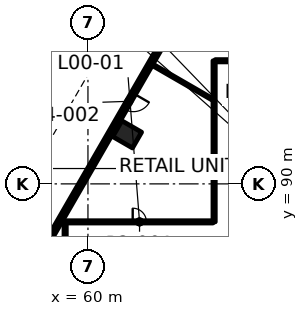
"""IFC4 building model, lengths in metres.
Left out: names, types, materials, properties, quantities, classifications, styles, units other than length and angle.
Written with IfcOpenShell. Run it as: python <this file> out.ifc"""

import sys

from ifc_helpers import new_model, si_unit, direction, frame, frame_2d, origin, origin_2d, place, context, subcontext, project, spatial, rectangle, extrude, element, fill, save


model = new_model("IFC4")
c1 = context("Model", 3, precision=1e-05, world=origin(), true_north=direction((0.0, 1.0)))
c2 = subcontext(c1, "Body", "Model", "MODEL_VIEW")
j1 = project(units=[si_unit("LENGTHUNIT", "METRE"), si_unit("PLANEANGLEUNIT", "RADIAN")], contexts=[c1])
p1 = place(None, origin())
s1 = spatial("IfcSite", under=j1, at=p1, CompositionType="ELEMENT")
p2 = place(p1, origin())
s2 = spatial("IfcBuilding", under=s1, at=p2, CompositionType="ELEMENT")
p3 = place(p2, origin())
s3 = spatial("IfcBuildingStorey", under=s2, at=p3, CompositionType="ELEMENT", Elevation=0.0)
p4 = place(p3, frame((62.579, 93.256, 0.0), z_axis=(0.0, 0.0, 1.0), x_axis=(-0.5, -0.866025403784, 0.0)))
e1 = element("IfcColumn", 1, at=p4, inside=s3, PredefinedType="COLUMN", context=c2, shape_type="SweptSolid", body=[
    extrude(rectangle(XDim=1.2, YDim=1.5, at=origin_2d()), origin(), (0.0, 0.0, 1.0), 8.0),
])
p5 = place(p3, frame((58.563, 87.5, 0.0), z_axis=(0.0, 0.0, 1.0), x_axis=(1.0, 0.0, 0.0)))
e2 = element("IfcWall", 2, at=p5, inside=s3, PredefinedType="PARTITIONING", context=c2, shape_type="SweptSolid", body=[
    extrude(rectangle(XDim=9.662, YDim=0.15, at=frame_2d((4.831, 0.0))), origin(), (0.0, 0.0, 1.0), 6.865),
])
p6 = place(p5, frame((4.381, 0.0, 0.0)))
e3 = element("IfcOpeningElement", 3, at=p6, cuts=e2, PredefinedType="OPENING", context=c2, shape_type="SweptSolid", body=[
    extrude(rectangle(XDim=0.9, YDim=2.1, at=frame_2d((0.45, 1.05))), frame((0.0, 0.085, 0.0), z_axis=(0.0, -1.0, 0.0), x_axis=(1.0, 0.0, 0.0)), (0.0, 0.0, 1.0), 0.17),
])
p7 = place(p3, frame((68.375, 98.1, 0.0), z_axis=(0.0, 0.0, 1.0), x_axis=(1.0, 0.0, 0.0)))
e4 = element("IfcWall", 4, at=p7, inside=s3, PredefinedType="PARTITIONING", context=c2, shape_type="SweptSolid", body=[
    extrude(rectangle(XDim=5.649, YDim=0.15, at=frame_2d((2.825, 0.0))), origin(), (0.0, 0.0, 1.0), 7.1),
])
p8 = place(p7, frame((2.375, 0.0, 0.0)))
e5 = element("IfcOpeningElement", 5, at=p8, cuts=e4, PredefinedType="OPENING", context=c2, shape_type="SweptSolid", body=[
    extrude(rectangle(XDim=0.9, YDim=2.1, at=frame_2d((0.45, 1.05))), frame((0.0, 0.085, 0.0), z_axis=(0.0, -1.0, 0.0), x_axis=(1.0, 0.0, 0.0)), (0.0, 0.0, 1.0), 0.17),
])
p9 = place(p3, frame((68.3, 87.5, 0.0), z_axis=(0.0, 0.0, 1.0), x_axis=(0.0, 1.0, 0.0)))
e6 = element("IfcWall", 6, at=p9, inside=s3, PredefinedType="PARTITIONING", context=c2, shape_type="SweptSolid", body=[
    extrude(rectangle(XDim=10.6, YDim=0.15, at=frame_2d((5.3, 0.0))), origin(), (0.0, 0.0, 1.0), 7.1),
])
p10 = place(p3, frame((58.5, 85.219, 0.0), z_axis=(0.0, 0.0, 1.0), x_axis=(0.0, 1.0, 0.0)))
e7 = element("IfcWall", 7, at=p10, inside=s3, PredefinedType="PARTITIONING", context=c2, shape_type="SweptSolid", body=[
    extrude(rectangle(XDim=2.17, YDim=0.15, at=frame_2d((1.085, 0.0))), origin(), (0.0, 0.0, 1.0), 6.865),
])
p11 = place(p3, frame((68.199, 95.554, 0.0), z_axis=(0.0, 0.0, 1.0), x_axis=(-0.866033412818, 0.49998612769, 0.0)))
e8 = element("IfcWall", 8, at=p11, inside=s3, PredefinedType="PARTITIONING", context=c2, shape_type="SweptSolid", body=[
    extrude(rectangle(XDim=4.676, YDim=0.1, at=frame_2d((2.338, 0.0))), origin(), (0.0, 0.0, 1.0), 6.865),
])
p12 = place(p3, frame((71.348, 110.424, 0.0), z_axis=(0.0, 0.0, 1.0), x_axis=(-0.500000550228, -0.86602508611, 0.0)))
e9 = element("IfcWall", 9, at=p12, inside=s3, PredefinedType="SOLIDWALL", context=c2, shape_type="SweptSolid", body=[
    extrude(rectangle(XDim=57.704, YDim=0.3, at=frame_2d((28.852, 0.0))), origin(), (0.0, 0.0, 1.0), 7.7),
])
p13 = place(p12, frame((16.711, 0.0, 0.0)))
e10 = element("IfcOpeningElement", 10, at=p13, cuts=e9, PredefinedType="OPENING", context=c2, shape_type="SweptSolid", body=[
    extrude(rectangle(XDim=1.2, YDim=2.4, at=frame_2d((0.6, 1.2))), frame((0.0, 0.16, 0.0), z_axis=(0.0, -1.0, 0.0), x_axis=(1.0, 0.0, 0.0)), (0.0, 0.0, 1.0), 0.32),
])
p14 = place(p12, frame((1.552, 0.0, 0.15)))
e11 = element("IfcOpeningElement", 11, at=p14, cuts=e9, PredefinedType="OPENING", context=c2, shape_type="SweptSolid", body=[
    extrude(rectangle(XDim=2.1, YDim=5.4, at=frame_2d((1.05, 2.7))), frame((0.0, 0.16, 0.0), z_axis=(0.0, -1.0, 0.0), x_axis=(1.0, 0.0, 0.0)), (0.0, 0.0, 1.0), 0.32),
])
p15 = place(p12, frame((4.052, 0.0, 0.15)))
e12 = element("IfcOpeningElement", 12, at=p15, cuts=e9, PredefinedType="OPENING", context=c2, shape_type="SweptSolid", body=[
    extrude(rectangle(XDim=2.1, YDim=5.4, at=frame_2d((1.05, 2.7))), frame((0.0, 0.16, 0.0), z_axis=(0.0, -1.0, 0.0), x_axis=(1.0, 0.0, 0.0)), (0.0, 0.0, 1.0), 0.32),
])
p16 = place(p12, frame((6.552, 0.0, 0.15)))
e13 = element("IfcOpeningElement", 13, at=p16, cuts=e9, PredefinedType="OPENING", context=c2, shape_type="SweptSolid", body=[
    extrude(rectangle(XDim=2.1, YDim=5.4, at=frame_2d((1.05, 2.7))), frame((0.0, 0.16, 0.0), z_axis=(0.0, -1.0, 0.0), x_axis=(1.0, 0.0, 0.0)), (0.0, 0.0, 1.0), 0.32),
])
p17 = place(p12, frame((9.052, 0.0, 0.15)))
e14 = element("IfcOpeningElement", 14, at=p17, cuts=e9, PredefinedType="OPENING", context=c2, shape_type="SweptSolid", body=[
    extrude(rectangle(XDim=2.1, YDim=5.4, at=frame_2d((1.05, 2.7))), frame((0.0, 0.16, 0.0), z_axis=(0.0, -1.0, 0.0), x_axis=(1.0, 0.0, 0.0)), (0.0, 0.0, 1.0), 0.32),
])
p18 = place(p12, frame((11.552, 0.0, 0.15)))
e15 = element("IfcOpeningElement", 15, at=p18, cuts=e9, PredefinedType="OPENING", context=c2, shape_type="SweptSolid", body=[
    extrude(rectangle(XDim=2.1, YDim=5.4, at=frame_2d((1.05, 2.7))), frame((0.0, 0.16, 0.0), z_axis=(0.0, -1.0, 0.0), x_axis=(1.0, 0.0, 0.0)), (0.0, 0.0, 1.0), 0.32),
])
p19 = place(p12, frame((14.052, 0.0, 0.15)))
e16 = element("IfcOpeningElement", 16, at=p19, cuts=e9, PredefinedType="OPENING", context=c2, shape_type="SweptSolid", body=[
    extrude(rectangle(XDim=2.1, YDim=5.4, at=frame_2d((1.05, 2.7))), frame((0.0, 0.16, 0.0), z_axis=(0.0, -1.0, 0.0), x_axis=(1.0, 0.0, 0.0)), (0.0, 0.0, 1.0), 0.32),
])
p20 = place(p12, frame((19.052, 0.0, 0.15)))
e17 = element("IfcOpeningElement", 17, at=p20, cuts=e9, PredefinedType="OPENING", context=c2, shape_type="SweptSolid", body=[
    extrude(rectangle(XDim=2.1, YDim=5.4, at=frame_2d((1.05, 2.7))), frame((0.0, 0.16, 0.0), z_axis=(0.0, -1.0, 0.0), x_axis=(1.0, 0.0, 0.0)), (0.0, 0.0, 1.0), 0.32),
])
p21 = place(p12, frame((21.552, 0.0, 0.15)))
e18 = element("IfcOpeningElement", 18, at=p21, cuts=e9, PredefinedType="OPENING", context=c2, shape_type="SweptSolid", body=[
    extrude(rectangle(XDim=2.1, YDim=5.4, at=frame_2d((1.05, 2.7))), frame((0.0, 0.16, 0.0), z_axis=(0.0, -1.0, 0.0), x_axis=(1.0, 0.0, 0.0)), (0.0, 0.0, 1.0), 0.32),
])
p22 = place(p12, frame((24.052, 0.0, 0.15)))
e19 = element("IfcOpeningElement", 19, at=p22, cuts=e9, PredefinedType="OPENING", context=c2, shape_type="SweptSolid", body=[
    extrude(rectangle(XDim=2.1, YDim=5.4, at=frame_2d((1.05, 2.7))), frame((0.0, 0.16, 0.0), z_axis=(0.0, -1.0, 0.0), x_axis=(1.0, 0.0, 0.0)), (0.0, 0.0, 1.0), 0.32),
])
p23 = place(p12, frame((26.552, 0.0, 0.15)))
e20 = element("IfcOpeningElement", 20, at=p23, cuts=e9, PredefinedType="OPENING", context=c2, shape_type="SweptSolid", body=[
    extrude(rectangle(XDim=2.1, YDim=5.4, at=frame_2d((1.05, 2.7))), frame((0.0, 0.16, 0.0), z_axis=(0.0, -1.0, 0.0), x_axis=(1.0, 0.0, 0.0)), (0.0, 0.0, 1.0), 0.32),
])
p24 = place(p12, frame((29.052, 0.0, 0.15)))
e21 = element("IfcOpeningElement", 21, at=p24, cuts=e9, PredefinedType="OPENING", context=c2, shape_type="SweptSolid", body=[
    extrude(rectangle(XDim=2.1, YDim=5.4, at=frame_2d((1.05, 2.7))), frame((0.0, 0.16, 0.0), z_axis=(0.0, -1.0, 0.0), x_axis=(1.0, 0.0, 0.0)), (0.0, 0.0, 1.0), 0.32),
])
p25 = place(p12, frame((31.552, 0.0, 0.15)))
e22 = element("IfcOpeningElement", 22, at=p25, cuts=e9, PredefinedType="OPENING", context=c2, shape_type="SweptSolid", body=[
    extrude(rectangle(XDim=2.1, YDim=5.4, at=frame_2d((1.05, 2.7))), frame((0.0, 0.16, 0.0), z_axis=(0.0, -1.0, 0.0), x_axis=(1.0, 0.0, 0.0)), (0.0, 0.0, 1.0), 0.32),
])
p26 = place(p12, frame((34.052, 0.0, 0.15)))
e23 = element("IfcOpeningElement", 23, at=p26, cuts=e9, PredefinedType="OPENING", context=c2, shape_type="SweptSolid", body=[
    extrude(rectangle(XDim=2.1, YDim=5.4, at=frame_2d((1.05, 2.7))), frame((0.0, 0.16, 0.0), z_axis=(0.0, -1.0, 0.0), x_axis=(1.0, 0.0, 0.0)), (0.0, 0.0, 1.0), 0.32),
])
p27 = place(p12, frame((36.552, 0.0, 0.15)))
e24 = element("IfcOpeningElement", 24, at=p27, cuts=e9, PredefinedType="OPENING", context=c2, shape_type="SweptSolid", body=[
    extrude(rectangle(XDim=2.1, YDim=5.4, at=frame_2d((1.05, 2.7))), frame((0.0, 0.16, 0.0), z_axis=(0.0, -1.0, 0.0), x_axis=(1.0, 0.0, 0.0)), (0.0, 0.0, 1.0), 0.32),
])
p28 = place(p12, frame((39.052, 0.0, 0.15)))
e25 = element("IfcOpeningElement", 25, at=p28, cuts=e9, PredefinedType="OPENING", context=c2, shape_type="SweptSolid", body=[
    extrude(rectangle(XDim=2.1, YDim=5.4, at=frame_2d((1.05, 2.7))), frame((0.0, 0.16, 0.0), z_axis=(0.0, -1.0, 0.0), x_axis=(1.0, 0.0, 0.0)), (0.0, 0.0, 1.0), 0.32),
])
p29 = place(p12, frame((41.552, 0.0, 0.15)))
e26 = element("IfcOpeningElement", 26, at=p29, cuts=e9, PredefinedType="OPENING", context=c2, shape_type="SweptSolid", body=[
    extrude(rectangle(XDim=2.1, YDim=5.4, at=frame_2d((1.05, 2.7))), frame((0.0, 0.16, 0.0), z_axis=(0.0, -1.0, 0.0), x_axis=(1.0, 0.0, 0.0)), (0.0, 0.0, 1.0), 0.32),
])
p30 = place(p12, frame((44.052, 0.0, 0.15)))
e27 = element("IfcOpeningElement", 27, at=p30, cuts=e9, PredefinedType="OPENING", context=c2, shape_type="SweptSolid", body=[
    extrude(rectangle(XDim=2.1, YDim=5.4, at=frame_2d((1.05, 2.7))), frame((0.0, 0.16, 0.0), z_axis=(0.0, -1.0, 0.0), x_axis=(1.0, 0.0, 0.0)), (0.0, 0.0, 1.0), 0.32),
])
p31 = place(p12, frame((46.552, 0.0, 0.15)))
e28 = element("IfcOpeningElement", 28, at=p31, cuts=e9, PredefinedType="OPENING", context=c2, shape_type="SweptSolid", body=[
    extrude(rectangle(XDim=2.1, YDim=5.4, at=frame_2d((1.05, 2.7))), frame((0.0, 0.16, 0.0), z_axis=(0.0, -1.0, 0.0), x_axis=(1.0, 0.0, 0.0)), (0.0, 0.0, 1.0), 0.32),
])
p32 = place(p12, frame((49.052, 0.0, 0.15)))
e29 = element("IfcOpeningElement", 29, at=p32, cuts=e9, PredefinedType="OPENING", context=c2, shape_type="SweptSolid", body=[
    extrude(rectangle(XDim=2.1, YDim=5.4, at=frame_2d((1.05, 2.7))), frame((0.0, 0.16, 0.0), z_axis=(0.0, -1.0, 0.0), x_axis=(1.0, 0.0, 0.0)), (0.0, 0.0, 1.0), 0.32),
])
p33 = place(p12, frame((51.552, 0.0, 0.15)))
e30 = element("IfcOpeningElement", 30, at=p33, cuts=e9, PredefinedType="OPENING", context=c2, shape_type="SweptSolid", body=[
    extrude(rectangle(XDim=2.1, YDim=5.4, at=frame_2d((1.05, 2.7))), frame((0.0, 0.16, 0.0), z_axis=(0.0, -1.0, 0.0), x_axis=(1.0, 0.0, 0.0)), (0.0, 0.0, 1.0), 0.32),
])
p34 = place(p12, frame((54.052, 0.0, 0.15)))
e31 = element("IfcOpeningElement", 31, at=p34, cuts=e9, PredefinedType="OPENING", context=c2, shape_type="SweptSolid", body=[
    extrude(rectangle(XDim=2.1, YDim=5.4, at=frame_2d((1.05, 2.7))), frame((0.0, 0.16, 0.0), z_axis=(0.0, -1.0, 0.0), x_axis=(1.0, 0.0, 0.0)), (0.0, 0.0, 1.0), 0.32),
])
p35 = place(p6, origin())
e32 = element("IfcDoor", 32, at=p35, inside=s3, OperationType="SINGLE_SWING_LEFT", PredefinedType="DOOR", context=c2, shape_type="SweptSolid", body=[
    extrude(rectangle(XDim=0.9, YDim=2.1, at=frame_2d((0.45, 1.05))), frame((0.0, 0.025, 0.0), z_axis=(0.0, -1.0, 0.0), x_axis=(1.0, 0.0, 0.0)), (0.0, 0.0, 1.0), 0.05),
])
fill(e3, e32)
p36 = place(p13, origin())
e33 = element("IfcDoor", 33, at=p36, inside=s3, OperationType="SINGLE_SWING_RIGHT", PredefinedType="DOOR", context=c2, shape_type="SweptSolid", body=[
    extrude(rectangle(XDim=1.2, YDim=2.4, at=frame_2d((0.6, 1.2))), frame((0.0, 0.025, 0.0), z_axis=(0.0, -1.0, 0.0), x_axis=(1.0, 0.0, 0.0)), (0.0, 0.0, 1.0), 0.05),
])
fill(e10, e33)
p37 = place(p18, origin())
e34 = element("IfcWindow", 34, at=p37, inside=s3, PartitioningType="SINGLE_PANEL", PredefinedType="WINDOW", context=c2, shape_type="SweptSolid", body=[
    extrude(rectangle(XDim=2.1, YDim=5.4, at=frame_2d((1.05, 2.7))), frame((0.0, 0.03, 0.0), z_axis=(0.0, -1.0, 0.0), x_axis=(1.0, 0.0, 0.0)), (0.0, 0.0, 1.0), 0.06),
])
fill(e15, e34)
p38 = place(p19, origin())
e35 = element("IfcWindow", 35, at=p38, inside=s3, PartitioningType="SINGLE_PANEL", PredefinedType="WINDOW", context=c2, shape_type="SweptSolid", body=[
    extrude(rectangle(XDim=2.1, YDim=5.4, at=frame_2d((1.05, 2.7))), frame((0.0, 0.03, 0.0), z_axis=(0.0, -1.0, 0.0), x_axis=(1.0, 0.0, 0.0)), (0.0, 0.0, 1.0), 0.06),
])
fill(e16, e35)
p39 = place(p20, origin())
e36 = element("IfcWindow", 36, at=p39, inside=s3, PartitioningType="SINGLE_PANEL", PredefinedType="WINDOW", context=c2, shape_type="SweptSolid", body=[
    extrude(rectangle(XDim=2.1, YDim=5.4, at=frame_2d((1.05, 2.7))), frame((0.0, 0.03, 0.0), z_axis=(0.0, -1.0, 0.0), x_axis=(1.0, 0.0, 0.0)), (0.0, 0.0, 1.0), 0.06),
])
fill(e17, e36)
p40 = place(p21, origin())
e37 = element("IfcWindow", 37, at=p40, inside=s3, PartitioningType="SINGLE_PANEL", PredefinedType="WINDOW", context=c2, shape_type="SweptSolid", body=[
    extrude(rectangle(XDim=2.1, YDim=5.4, at=frame_2d((1.05, 2.7))), frame((0.0, 0.03, 0.0), z_axis=(0.0, -1.0, 0.0), x_axis=(1.0, 0.0, 0.0)), (0.0, 0.0, 1.0), 0.06),
])
fill(e18, e37)
p41 = place(p22, origin())
e38 = element("IfcWindow", 38, at=p41, inside=s3, PartitioningType="SINGLE_PANEL", PredefinedType="WINDOW", context=c2, shape_type="SweptSolid", body=[
    extrude(rectangle(XDim=2.1, YDim=5.4, at=frame_2d((1.05, 2.7))), frame((0.0, 0.03, 0.0), z_axis=(0.0, -1.0, 0.0), x_axis=(1.0, 0.0, 0.0)), (0.0, 0.0, 1.0), 0.06),
])
fill(e19, e38)
p42 = place(p23, origin())
e39 = element("IfcWindow", 39, at=p42, inside=s3, PartitioningType="SINGLE_PANEL", PredefinedType="WINDOW", context=c2, shape_type="SweptSolid", body=[
    extrude(rectangle(XDim=2.1, YDim=5.4, at=frame_2d((1.05, 2.7))), frame((0.0, 0.03, 0.0), z_axis=(0.0, -1.0, 0.0), x_axis=(1.0, 0.0, 0.0)), (0.0, 0.0, 1.0), 0.06),
])
fill(e20, e39)
save(model, sys.argv[1])
